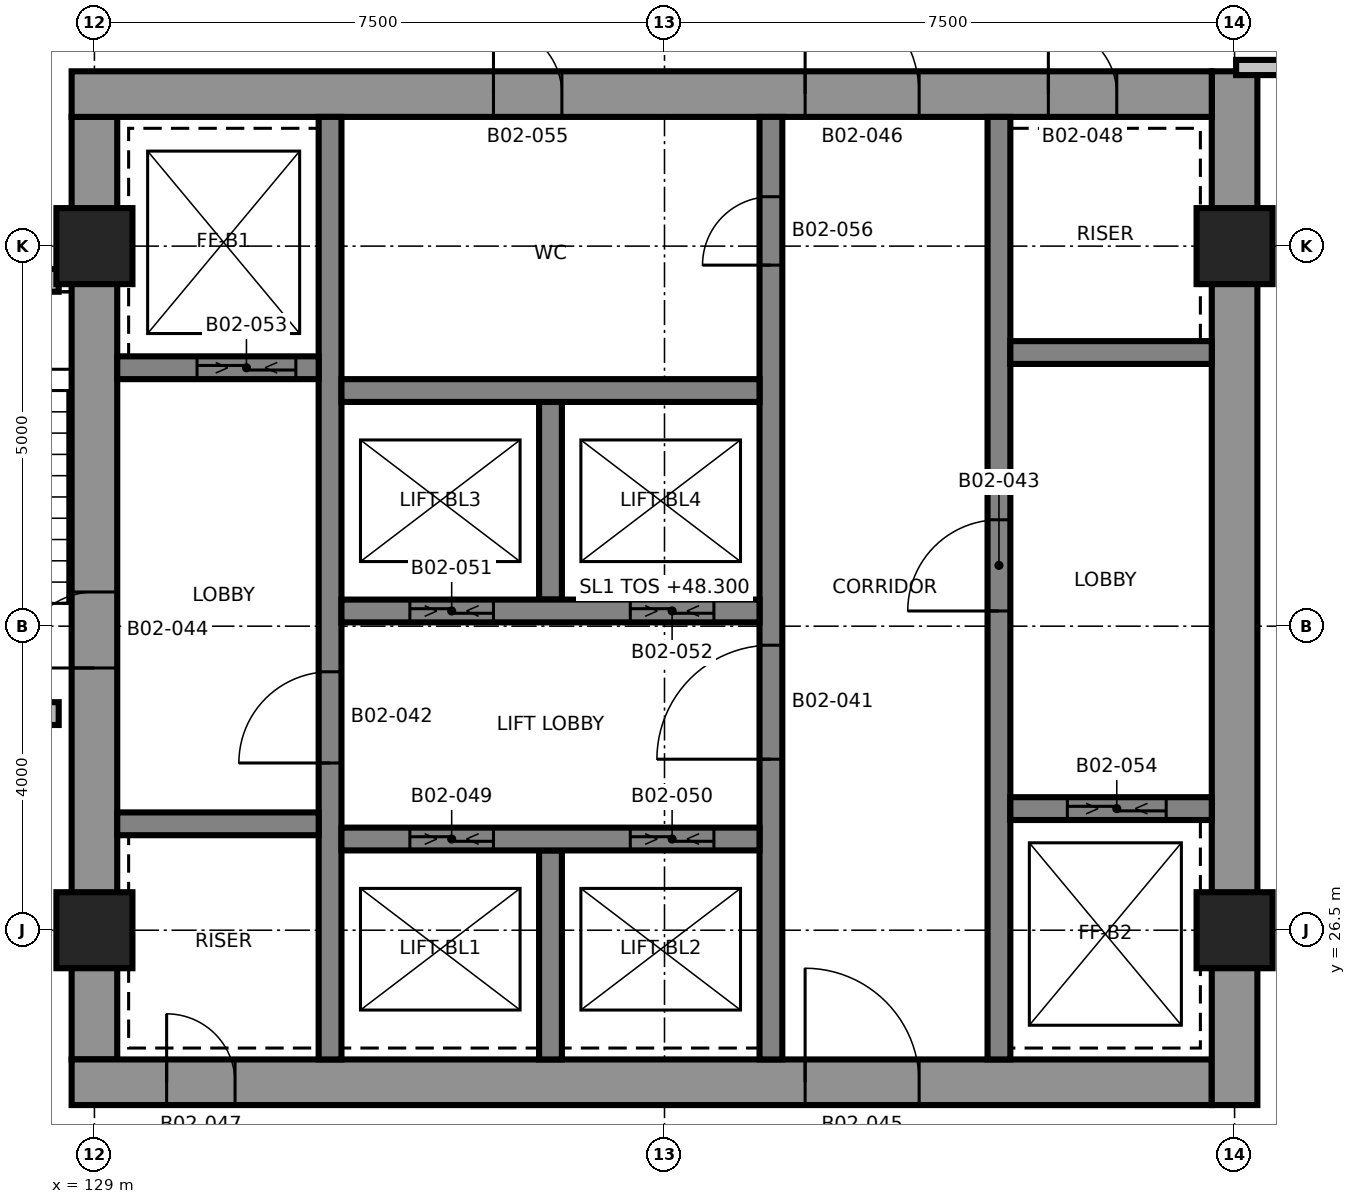
"""IFC4 building model, lengths in metres.
Left out: names, types, materials, properties, quantities, classifications, styles, units other than length and angle.
Written with IfcOpenShell. Run it as: python <this file> out.ifc"""

import sys

from ifc_helpers import new_model, si_unit, direction, frame, frame_2d, origin, origin_2d, place, context, subcontext, project, spatial, rectangle, extrude, element, fill, save


model = new_model("IFC4")
c1 = context("Model", 3, precision=1e-05, world=origin(), true_north=direction((0.0, 1.0)))
c2 = subcontext(c1, "Body", "Model", "MODEL_VIEW")
j1 = project(units=[si_unit("LENGTHUNIT", "METRE"), si_unit("PLANEANGLEUNIT", "RADIAN")], contexts=[c1])
p1 = place(None, origin())
s1 = spatial("IfcSite", under=j1, at=p1, CompositionType="ELEMENT")
p2 = place(p1, origin())
s2 = spatial("IfcBuilding", under=s1, at=p2, CompositionType="ELEMENT")
p3 = place(p2, frame((0.0, 0.0, 48.3)))
s3 = spatial("IfcBuildingStorey", under=s2, at=p3, CompositionType="ELEMENT", Elevation=48.3)
p4 = place(p3, frame((129.0, 24.8, 0.0), z_axis=(0.0, 0.0, 1.0), x_axis=(0.0, 1.0, 0.0)))
e1 = element("IfcWall", 1, at=p4, inside=s3, PredefinedType="SHEAR", context=c2, shape_type="SweptSolid", body=[
    extrude(rectangle(XDim=12.4, YDim=0.6, at=frame_2d((6.2, 0.0))), origin(), (0.0, 0.0, 1.0), 3.7),
])
p5 = place(p4, frame((5.15, 0.0, 0.0)))
e2 = element("IfcOpeningElement", 2, at=p5, cuts=e1, PredefinedType="OPENING", context=c2, shape_type="SweptSolid", body=[
    extrude(rectangle(XDim=1.0, YDim=2.1, at=frame_2d((0.5, 1.05))), frame((0.0, 0.31, 0.0), z_axis=(0.0, -1.0, 0.0), x_axis=(1.0, 0.0, 0.0)), (0.0, 0.0, 1.0), 0.62),
])
p6 = place(p3, frame((128.7, 24.5, 0.0), z_axis=(0.0, 0.0, 1.0), x_axis=(1.0, 0.0, 0.0)))
e3 = element("IfcWall", 3, at=p6, inside=s3, PredefinedType="SHEAR", context=c2, shape_type="SweptSolid", body=[
    extrude(rectangle(XDim=15.0, YDim=0.6, at=frame_2d((7.5, 0.0))), origin(), (0.0, 0.0, 1.0), 3.7),
])
p7 = place(p6, frame((9.65, 0.0, 0.0)))
e4 = element("IfcOpeningElement", 4, at=p7, cuts=e3, PredefinedType="OPENING", context=c2, shape_type="SweptSolid", body=[
    extrude(rectangle(XDim=1.5, YDim=2.1, at=frame_2d((0.75, 1.05))), frame((0.0, 0.31, 0.0), z_axis=(0.0, -1.0, 0.0), x_axis=(1.0, 0.0, 0.0)), (0.0, 0.0, 1.0), 0.62),
])
p8 = place(p6, frame((1.25, 0.0, 0.0)))
e5 = element("IfcOpeningElement", 5, at=p8, cuts=e3, PredefinedType="OPENING", context=c2, shape_type="SweptSolid", body=[
    extrude(rectangle(XDim=0.9, YDim=2.1, at=frame_2d((0.45, 1.05))), frame((0.0, 0.31, 0.0), z_axis=(0.0, -1.0, 0.0), x_axis=(1.0, 0.0, 0.0)), (0.0, 0.0, 1.0), 0.62),
])
p9 = place(p3, frame((144.0, 24.2, 0.0), z_axis=(0.0, 0.0, 1.0), x_axis=(0.0, 1.0, 0.0)))
e6 = element("IfcWall", 6, at=p9, inside=s3, PredefinedType="SHEAR", context=c2, shape_type="SweptSolid", body=[
    extrude(rectangle(XDim=13.6, YDim=0.6, at=frame_2d((6.8, 0.0))), origin(), (0.0, 0.0, 1.0), 3.7),
])
p10 = place(p3, frame((128.7, 37.5, 0.0), z_axis=(0.0, 0.0, 1.0), x_axis=(1.0, 0.0, 0.0)))
e7 = element("IfcWall", 7, at=p10, inside=s3, PredefinedType="SHEAR", context=c2, shape_type="SweptSolid", body=[
    extrude(rectangle(XDim=15.0, YDim=0.6, at=frame_2d((7.5, 0.0))), origin(), (0.0, 0.0, 1.0), 3.7),
])
p11 = place(p10, frame((9.65, 0.0, 0.0)))
e8 = element("IfcOpeningElement", 8, at=p11, cuts=e7, PredefinedType="OPENING", context=c2, shape_type="SweptSolid", body=[
    extrude(rectangle(XDim=1.5, YDim=2.1, at=frame_2d((0.75, 1.05))), frame((0.0, 0.31, 0.0), z_axis=(0.0, -1.0, 0.0), x_axis=(1.0, 0.0, 0.0)), (0.0, 0.0, 1.0), 0.62),
])
p12 = place(p10, frame((12.85, 0.0, 0.0)))
e9 = element("IfcOpeningElement", 9, at=p12, cuts=e7, PredefinedType="OPENING", context=c2, shape_type="SweptSolid", body=[
    extrude(rectangle(XDim=0.9, YDim=2.1, at=frame_2d((0.45, 1.05))), frame((0.0, 0.31, 0.0), z_axis=(0.0, -1.0, 0.0), x_axis=(1.0, 0.0, 0.0)), (0.0, 0.0, 1.0), 0.62),
])
p13 = place(p10, frame((5.55, 0.0, 0.0)))
e10 = element("IfcOpeningElement", 10, at=p13, cuts=e7, PredefinedType="OPENING", context=c2, shape_type="SweptSolid", body=[
    extrude(rectangle(XDim=0.9, YDim=2.1, at=frame_2d((0.45, 1.05))), frame((0.0, 0.31, 0.0), z_axis=(0.0, -1.0, 0.0), x_axis=(1.0, 0.0, 0.0)), (0.0, 0.0, 1.0), 0.62),
])
p14 = place(p3, frame((132.1, 24.8, 0.0), z_axis=(0.0, 0.0, 1.0), x_axis=(0.0, 1.0, 0.0)))
e11 = element("IfcWall", 11, at=p14, inside=s3, PredefinedType="SHEAR", context=c2, shape_type="SweptSolid", body=[
    extrude(rectangle(XDim=12.4, YDim=0.3, at=frame_2d((6.2, 0.0))), origin(), (0.0, 0.0, 1.0), 3.7),
])
p15 = place(p14, frame((3.9, 0.0, 0.0)))
e12 = element("IfcOpeningElement", 12, at=p15, cuts=e11, PredefinedType="OPENING", context=c2, shape_type="SweptSolid", body=[
    extrude(rectangle(XDim=1.2, YDim=2.1, at=frame_2d((0.6, 1.05))), frame((0.0, 0.16, 0.0), z_axis=(0.0, -1.0, 0.0), x_axis=(1.0, 0.0, 0.0)), (0.0, 0.0, 1.0), 0.32),
])
p16 = place(p3, frame((137.9, 24.8, 0.0), z_axis=(0.0, 0.0, 1.0), x_axis=(0.0, 1.0, 0.0)))
e13 = element("IfcWall", 13, at=p16, inside=s3, PredefinedType="SHEAR", context=c2, shape_type="SweptSolid", body=[
    extrude(rectangle(XDim=12.4, YDim=0.3, at=frame_2d((6.2, 0.0))), origin(), (0.0, 0.0, 1.0), 3.7),
])
p17 = place(p16, frame((3.95, 0.0, 0.0)))
e14 = element("IfcOpeningElement", 14, at=p17, cuts=e13, PredefinedType="OPENING", context=c2, shape_type="SweptSolid", body=[
    extrude(rectangle(XDim=1.5, YDim=2.1, at=frame_2d((0.75, 1.05))), frame((0.0, 0.16, 0.0), z_axis=(0.0, -1.0, 0.0), x_axis=(1.0, 0.0, 0.0)), (0.0, 0.0, 1.0), 0.32),
])
p18 = place(p16, frame((10.45, 0.0, 0.0)))
e15 = element("IfcOpeningElement", 15, at=p18, cuts=e13, PredefinedType="OPENING", context=c2, shape_type="SweptSolid", body=[
    extrude(rectangle(XDim=0.9, YDim=2.1, at=frame_2d((0.45, 1.05))), frame((0.0, 0.16, 0.0), z_axis=(0.0, -1.0, 0.0), x_axis=(1.0, 0.0, 0.0)), (0.0, 0.0, 1.0), 0.32),
])
p19 = place(p3, frame((140.9, 24.8, 0.0), z_axis=(0.0, 0.0, 1.0), x_axis=(0.0, 1.0, 0.0)))
e16 = element("IfcWall", 16, at=p19, inside=s3, PredefinedType="SHEAR", context=c2, shape_type="SweptSolid", body=[
    extrude(rectangle(XDim=12.4, YDim=0.3, at=frame_2d((6.2, 0.0))), origin(), (0.0, 0.0, 1.0), 3.7),
])
p20 = place(p19, frame((5.9, 0.0, 0.0)))
e17 = element("IfcOpeningElement", 17, at=p20, cuts=e16, PredefinedType="OPENING", context=c2, shape_type="SweptSolid", body=[
    extrude(rectangle(XDim=1.2, YDim=2.1, at=frame_2d((0.6, 1.05))), frame((0.0, 0.16, 0.0), z_axis=(0.0, -1.0, 0.0), x_axis=(1.0, 0.0, 0.0)), (0.0, 0.0, 1.0), 0.32),
])
p21 = place(p3, frame((135.0, 24.8, 0.0), z_axis=(0.0, 0.0, 1.0), x_axis=(0.0, 1.0, 0.0)))
e18 = element("IfcWall", 18, at=p21, inside=s3, PredefinedType="SHEAR", context=c2, shape_type="SweptSolid", body=[
    extrude(rectangle(XDim=2.75, YDim=0.3, at=frame_2d((1.375, 0.0))), origin(), (0.0, 0.0, 1.0), 3.7),
])
p22 = place(p3, frame((135.0, 30.85, 0.0), z_axis=(0.0, 0.0, 1.0), x_axis=(0.0, 1.0, 0.0)))
e19 = element("IfcWall", 19, at=p22, inside=s3, PredefinedType="SHEAR", context=c2, shape_type="SweptSolid", body=[
    extrude(rectangle(XDim=2.6, YDim=0.3, at=frame_2d((1.3, 0.0))), origin(), (0.0, 0.0, 1.0), 3.7),
])
p23 = place(p3, frame((132.25, 27.7, 0.0), z_axis=(0.0, 0.0, 1.0), x_axis=(1.0, 0.0, 0.0)))
e20 = element("IfcWall", 20, at=p23, inside=s3, PredefinedType="SHEAR", context=c2, shape_type="SweptSolid", body=[
    extrude(rectangle(XDim=5.5, YDim=0.3, at=frame_2d((2.75, 0.0))), origin(), (0.0, 0.0, 1.0), 3.7),
])
p24 = place(p23, frame((0.9, 0.0, 0.0)))
e21 = element("IfcOpeningElement", 21, at=p24, cuts=e20, PredefinedType="OPENING", context=c2, shape_type="SweptSolid", body=[
    extrude(rectangle(XDim=1.1, YDim=2.4, at=frame_2d((0.55, 1.2))), frame((0.0, 0.16, 0.0), z_axis=(0.0, -1.0, 0.0), x_axis=(1.0, 0.0, 0.0)), (0.0, 0.0, 1.0), 0.32),
])
p25 = place(p23, frame((3.8, 0.0, 0.0)))
e22 = element("IfcOpeningElement", 22, at=p25, cuts=e20, PredefinedType="OPENING", context=c2, shape_type="SweptSolid", body=[
    extrude(rectangle(XDim=1.1, YDim=2.4, at=frame_2d((0.55, 1.2))), frame((0.0, 0.16, 0.0), z_axis=(0.0, -1.0, 0.0), x_axis=(1.0, 0.0, 0.0)), (0.0, 0.0, 1.0), 0.32),
])
p26 = place(p3, frame((132.25, 30.7, 0.0), z_axis=(0.0, 0.0, 1.0), x_axis=(1.0, 0.0, 0.0)))
e23 = element("IfcWall", 23, at=p26, inside=s3, PredefinedType="SHEAR", context=c2, shape_type="SweptSolid", body=[
    extrude(rectangle(XDim=5.5, YDim=0.3, at=frame_2d((2.75, 0.0))), origin(), (0.0, 0.0, 1.0), 3.7),
])
p27 = place(p26, frame((0.9, 0.0, 0.0)))
e24 = element("IfcOpeningElement", 24, at=p27, cuts=e23, PredefinedType="OPENING", context=c2, shape_type="SweptSolid", body=[
    extrude(rectangle(XDim=1.1, YDim=2.4, at=frame_2d((0.55, 1.2))), frame((0.0, 0.16, 0.0), z_axis=(0.0, -1.0, 0.0), x_axis=(1.0, 0.0, 0.0)), (0.0, 0.0, 1.0), 0.32),
])
p28 = place(p26, frame((3.8, 0.0, 0.0)))
e25 = element("IfcOpeningElement", 25, at=p28, cuts=e23, PredefinedType="OPENING", context=c2, shape_type="SweptSolid", body=[
    extrude(rectangle(XDim=1.1, YDim=2.4, at=frame_2d((0.55, 1.2))), frame((0.0, 0.16, 0.0), z_axis=(0.0, -1.0, 0.0), x_axis=(1.0, 0.0, 0.0)), (0.0, 0.0, 1.0), 0.32),
])
p29 = place(p3, frame((132.25, 33.6, 0.0), z_axis=(0.0, 0.0, 1.0), x_axis=(1.0, 0.0, 0.0)))
e26 = element("IfcWall", 26, at=p29, inside=s3, PredefinedType="SHEAR", context=c2, shape_type="SweptSolid", body=[
    extrude(rectangle(XDim=5.5, YDim=0.3, at=frame_2d((2.75, 0.0))), origin(), (0.0, 0.0, 1.0), 3.7),
])
p30 = place(p3, frame((129.3, 27.9, 0.0), z_axis=(0.0, 0.0, 1.0), x_axis=(1.0, 0.0, 0.0)))
e27 = element("IfcWall", 27, at=p30, inside=s3, PredefinedType="SHEAR", context=c2, shape_type="SweptSolid", body=[
    extrude(rectangle(XDim=2.65, YDim=0.3, at=frame_2d((1.325, 0.0))), origin(), (0.0, 0.0, 1.0), 3.7),
])
p31 = place(p3, frame((129.3, 33.9, 0.0), z_axis=(0.0, 0.0, 1.0), x_axis=(1.0, 0.0, 0.0)))
e28 = element("IfcWall", 28, at=p31, inside=s3, PredefinedType="SHEAR", context=c2, shape_type="SweptSolid", body=[
    extrude(rectangle(XDim=2.65, YDim=0.3, at=frame_2d((1.325, 0.0))), origin(), (0.0, 0.0, 1.0), 3.7),
])
p32 = place(p31, frame((1.05, 0.0, 0.0)))
e29 = element("IfcOpeningElement", 29, at=p32, cuts=e28, PredefinedType="OPENING", context=c2, shape_type="SweptSolid", body=[
    extrude(rectangle(XDim=1.3, YDim=2.4, at=frame_2d((0.65, 1.2))), frame((0.0, 0.16, 0.0), z_axis=(0.0, -1.0, 0.0), x_axis=(1.0, 0.0, 0.0)), (0.0, 0.0, 1.0), 0.32),
])
p33 = place(p3, frame((141.05, 28.1, 0.0), z_axis=(0.0, 0.0, 1.0), x_axis=(1.0, 0.0, 0.0)))
e30 = element("IfcWall", 30, at=p33, inside=s3, PredefinedType="SHEAR", context=c2, shape_type="SweptSolid", body=[
    extrude(rectangle(XDim=2.65, YDim=0.3, at=frame_2d((1.325, 0.0))), origin(), (0.0, 0.0, 1.0), 3.7),
])
p34 = place(p33, frame((0.75, 0.0, 0.0)))
e31 = element("IfcOpeningElement", 31, at=p34, cuts=e30, PredefinedType="OPENING", context=c2, shape_type="SweptSolid", body=[
    extrude(rectangle(XDim=1.3, YDim=2.4, at=frame_2d((0.65, 1.2))), frame((0.0, 0.16, 0.0), z_axis=(0.0, -1.0, 0.0), x_axis=(1.0, 0.0, 0.0)), (0.0, 0.0, 1.0), 0.32),
])
p35 = place(p3, frame((141.05, 34.1, 0.0), z_axis=(0.0, 0.0, 1.0), x_axis=(1.0, 0.0, 0.0)))
e32 = element("IfcWall", 32, at=p35, inside=s3, PredefinedType="SHEAR", context=c2, shape_type="SweptSolid", body=[
    extrude(rectangle(XDim=2.65, YDim=0.3, at=frame_2d((1.325, 0.0))), origin(), (0.0, 0.0, 1.0), 3.7),
])
for number, where, z_axis, x_axis in (
    (33, (129.0, 26.5, 0.0), (0.0, 0.0, 1.0), (1.0, 0.0, 0.0)),
    (34, (144.0, 26.5, 0.0), (0.0, 0.0, 1.0), (1.0, 0.0, 0.0)),
    (35, (129.0, 35.5, 0.0), (0.0, 0.0, 1.0), (1.0, 0.0, 0.0)),
    (36, (144.0, 35.5, 0.0), (0.0, 0.0, 1.0), (1.0, 0.0, 0.0)),
):
    element("IfcColumn", number, at=place(p3, frame(where, z_axis=z_axis, x_axis=x_axis)), inside=s3, PredefinedType="COLUMN", context=c2, shape_type="SweptSolid", body=[
        extrude(rectangle(XDim=1.0, YDim=1.0, at=origin_2d()), origin(), (0.0, 0.0, 1.0), 3.7),
    ])
p36 = place(p3, frame((125.7, 29.35, 0.0), z_axis=(0.0, 0.0, 1.0), x_axis=(1.0, 0.0, 0.0)))
e37 = element("IfcWall", 37, at=p36, inside=s3, PredefinedType="SHEAR", context=c2, shape_type="SweptSolid", body=[
    extrude(rectangle(XDim=2.83, YDim=0.3, at=frame_2d((1.415, 0.0))), origin(), (0.0, 0.0, 1.0), 3.4),
])
p37 = place(p36, frame((0.975, 0.0, 0.0)))
e38 = element("IfcOpeningElement", 38, at=p37, cuts=e37, PredefinedType="OPENING", context=c2, shape_type="SweptSolid", body=[
    extrude(rectangle(XDim=1.2, YDim=2.1, at=frame_2d((0.6, 1.05))), frame((0.0, 0.16, 0.0), z_axis=(0.0, -1.0, 0.0), x_axis=(1.0, 0.0, 0.0)), (0.0, 0.0, 1.0), 0.32),
])
p38 = place(p3, frame((125.7, 35.05, 0.0), z_axis=(0.0, 0.0, 1.0), x_axis=(1.0, 0.0, 0.0)))
e39 = element("IfcWall", 39, at=p38, inside=s3, PredefinedType="SHEAR", context=c2, shape_type="SweptSolid", body=[
    extrude(rectangle(XDim=2.83, YDim=0.3, at=frame_2d((1.415, 0.0))), origin(), (0.0, 0.0, 1.0), 3.4),
])
p39 = place(p3, frame((144.02, 37.85, 0.0), z_axis=(0.0, 0.0, 1.0), x_axis=(1.0, 0.0, 0.0)))
e40 = element("IfcWall", 40, at=p39, inside=s3, PredefinedType="PARTITIONING", context=c2, shape_type="SweptSolid", body=[
    extrude(rectangle(XDim=3.23, YDim=0.2, at=frame_2d((1.615, 0.0))), origin(), (0.0, 0.0, 1.0), 3.4),
])
p40 = place(p39, frame((1.03, 0.0, 0.0)))
e41 = element("IfcOpeningElement", 41, at=p40, cuts=e40, PredefinedType="OPENING", context=c2, shape_type="SweptSolid", body=[
    extrude(rectangle(XDim=1.5, YDim=2.1, at=frame_2d((0.75, 1.05))), frame((0.0, 0.11, 0.0), z_axis=(0.0, -1.0, 0.0), x_axis=(1.0, 0.0, 0.0)), (0.0, 0.0, 1.0), 0.22),
])
p41 = place(p17, origin())
e42 = element("IfcDoor", 42, at=p41, inside=s3, OperationType="SINGLE_SWING_RIGHT", PredefinedType="DOOR", context=c2, shape_type="SweptSolid", body=[
    extrude(rectangle(XDim=1.5, YDim=2.1, at=frame_2d((0.75, 1.05))), frame((0.0, 0.025, 0.0), z_axis=(0.0, -1.0, 0.0), x_axis=(1.0, 0.0, 0.0)), (0.0, 0.0, 1.0), 0.05),
])
fill(e14, e42)
p42 = place(p15, origin())
e43 = element("IfcDoor", 43, at=p42, inside=s3, OperationType="SINGLE_SWING_LEFT", PredefinedType="DOOR", context=c2, shape_type="SweptSolid", body=[
    extrude(rectangle(XDim=1.2, YDim=2.1, at=frame_2d((0.6, 1.05))), frame((0.0, 0.025, 0.0), z_axis=(0.0, -1.0, 0.0), x_axis=(1.0, 0.0, 0.0)), (0.0, 0.0, 1.0), 0.05),
])
fill(e12, e43)
p43 = place(p20, origin())
e44 = element("IfcDoor", 44, at=p43, inside=s3, OperationType="SINGLE_SWING_RIGHT", PredefinedType="DOOR", context=c2, shape_type="SweptSolid", body=[
    extrude(rectangle(XDim=1.2, YDim=2.1, at=frame_2d((0.6, 1.05))), frame((0.0, 0.025, 0.0), z_axis=(0.0, -1.0, 0.0), x_axis=(1.0, 0.0, 0.0)), (0.0, 0.0, 1.0), 0.05),
])
fill(e17, e44)
p44 = place(p5, origin())
e45 = element("IfcDoor", 45, at=p44, inside=s3, OperationType="SINGLE_SWING_RIGHT", PredefinedType="DOOR", context=c2, shape_type="SweptSolid", body=[
    extrude(rectangle(XDim=1.0, YDim=2.1, at=frame_2d((0.5, 1.05))), frame((0.0, 0.025, 0.0), z_axis=(0.0, -1.0, 0.0), x_axis=(1.0, 0.0, 0.0)), (0.0, 0.0, 1.0), 0.05),
])
fill(e2, e45)
p45 = place(p7, origin())
e46 = element("IfcDoor", 46, at=p45, inside=s3, OperationType="SINGLE_SWING_LEFT", PredefinedType="DOOR", context=c2, shape_type="SweptSolid", body=[
    extrude(rectangle(XDim=1.5, YDim=2.1, at=frame_2d((0.75, 1.05))), frame((0.0, 0.025, 0.0), z_axis=(0.0, -1.0, 0.0), x_axis=(1.0, 0.0, 0.0)), (0.0, 0.0, 1.0), 0.05),
])
fill(e4, e46)
p46 = place(p11, origin())
e47 = element("IfcDoor", 47, at=p46, inside=s3, OperationType="SINGLE_SWING_RIGHT", PredefinedType="DOOR", context=c2, shape_type="SweptSolid", body=[
    extrude(rectangle(XDim=1.5, YDim=2.1, at=frame_2d((0.75, 1.05))), frame((0.0, 0.025, 0.0), z_axis=(0.0, -1.0, 0.0), x_axis=(1.0, 0.0, 0.0)), (0.0, 0.0, 1.0), 0.05),
])
fill(e8, e47)
p47 = place(p8, origin())
e48 = element("IfcDoor", 48, at=p47, inside=s3, OperationType="SINGLE_SWING_LEFT", PredefinedType="DOOR", context=c2, shape_type="SweptSolid", body=[
    extrude(rectangle(XDim=0.9, YDim=2.1, at=frame_2d((0.45, 1.05))), frame((0.0, 0.025, 0.0), z_axis=(0.0, -1.0, 0.0), x_axis=(1.0, 0.0, 0.0)), (0.0, 0.0, 1.0), 0.05),
])
fill(e5, e48)
p48 = place(p12, origin())
e49 = element("IfcDoor", 49, at=p48, inside=s3, OperationType="SINGLE_SWING_RIGHT", PredefinedType="DOOR", context=c2, shape_type="SweptSolid", body=[
    extrude(rectangle(XDim=0.9, YDim=2.1, at=frame_2d((0.45, 1.05))), frame((0.0, 0.025, 0.0), z_axis=(0.0, -1.0, 0.0), x_axis=(1.0, 0.0, 0.0)), (0.0, 0.0, 1.0), 0.05),
])
fill(e9, e49)
p49 = place(p24, origin())
e50 = element("IfcDoor", 50, at=p49, inside=s3, OperationType="SLIDING_TO_LEFT", PredefinedType="DOOR", context=c2, shape_type="SweptSolid", body=[
    extrude(rectangle(XDim=1.1, YDim=2.4, at=frame_2d((0.55, 1.2))), frame((0.0, 0.025, 0.0), z_axis=(0.0, -1.0, 0.0), x_axis=(1.0, 0.0, 0.0)), (0.0, 0.0, 1.0), 0.05),
])
fill(e21, e50)
p50 = place(p25, origin())
e51 = element("IfcDoor", 51, at=p50, inside=s3, OperationType="SLIDING_TO_LEFT", PredefinedType="DOOR", context=c2, shape_type="SweptSolid", body=[
    extrude(rectangle(XDim=1.1, YDim=2.4, at=frame_2d((0.55, 1.2))), frame((0.0, 0.025, 0.0), z_axis=(0.0, -1.0, 0.0), x_axis=(1.0, 0.0, 0.0)), (0.0, 0.0, 1.0), 0.05),
])
fill(e22, e51)
p51 = place(p27, origin())
e52 = element("IfcDoor", 52, at=p51, inside=s3, OperationType="SLIDING_TO_LEFT", PredefinedType="DOOR", context=c2, shape_type="SweptSolid", body=[
    extrude(rectangle(XDim=1.1, YDim=2.4, at=frame_2d((0.55, 1.2))), frame((0.0, 0.025, 0.0), z_axis=(0.0, -1.0, 0.0), x_axis=(1.0, 0.0, 0.0)), (0.0, 0.0, 1.0), 0.05),
])
fill(e24, e52)
p52 = place(p28, origin())
e53 = element("IfcDoor", 53, at=p52, inside=s3, OperationType="SLIDING_TO_LEFT", PredefinedType="DOOR", context=c2, shape_type="SweptSolid", body=[
    extrude(rectangle(XDim=1.1, YDim=2.4, at=frame_2d((0.55, 1.2))), frame((0.0, 0.025, 0.0), z_axis=(0.0, -1.0, 0.0), x_axis=(1.0, 0.0, 0.0)), (0.0, 0.0, 1.0), 0.05),
])
fill(e25, e53)
p53 = place(p32, origin())
e54 = element("IfcDoor", 54, at=p53, inside=s3, OperationType="SLIDING_TO_LEFT", PredefinedType="DOOR", context=c2, shape_type="SweptSolid", body=[
    extrude(rectangle(XDim=1.3, YDim=2.4, at=frame_2d((0.65, 1.2))), frame((0.0, 0.025, 0.0), z_axis=(0.0, -1.0, 0.0), x_axis=(1.0, 0.0, 0.0)), (0.0, 0.0, 1.0), 0.05),
])
fill(e29, e54)
p54 = place(p34, origin())
e55 = element("IfcDoor", 55, at=p54, inside=s3, OperationType="SLIDING_TO_LEFT", PredefinedType="DOOR", context=c2, shape_type="SweptSolid", body=[
    extrude(rectangle(XDim=1.3, YDim=2.4, at=frame_2d((0.65, 1.2))), frame((0.0, 0.025, 0.0), z_axis=(0.0, -1.0, 0.0), x_axis=(1.0, 0.0, 0.0)), (0.0, 0.0, 1.0), 0.05),
])
fill(e31, e55)
p55 = place(p13, origin())
e56 = element("IfcDoor", 56, at=p55, inside=s3, OperationType="SINGLE_SWING_LEFT", PredefinedType="DOOR", context=c2, shape_type="SweptSolid", body=[
    extrude(rectangle(XDim=0.9, YDim=2.1, at=frame_2d((0.45, 1.05))), frame((0.0, 0.025, 0.0), z_axis=(0.0, -1.0, 0.0), x_axis=(1.0, 0.0, 0.0)), (0.0, 0.0, 1.0), 0.05),
])
fill(e10, e56)
p56 = place(p18, origin())
e57 = element("IfcDoor", 57, at=p56, inside=s3, OperationType="SINGLE_SWING_RIGHT", PredefinedType="DOOR", context=c2, shape_type="SweptSolid", body=[
    extrude(rectangle(XDim=0.9, YDim=2.1, at=frame_2d((0.45, 1.05))), frame((0.0, 0.025, 0.0), z_axis=(0.0, -1.0, 0.0), x_axis=(1.0, 0.0, 0.0)), (0.0, 0.0, 1.0), 0.05),
])
fill(e15, e57)
save(model, sys.argv[1])
